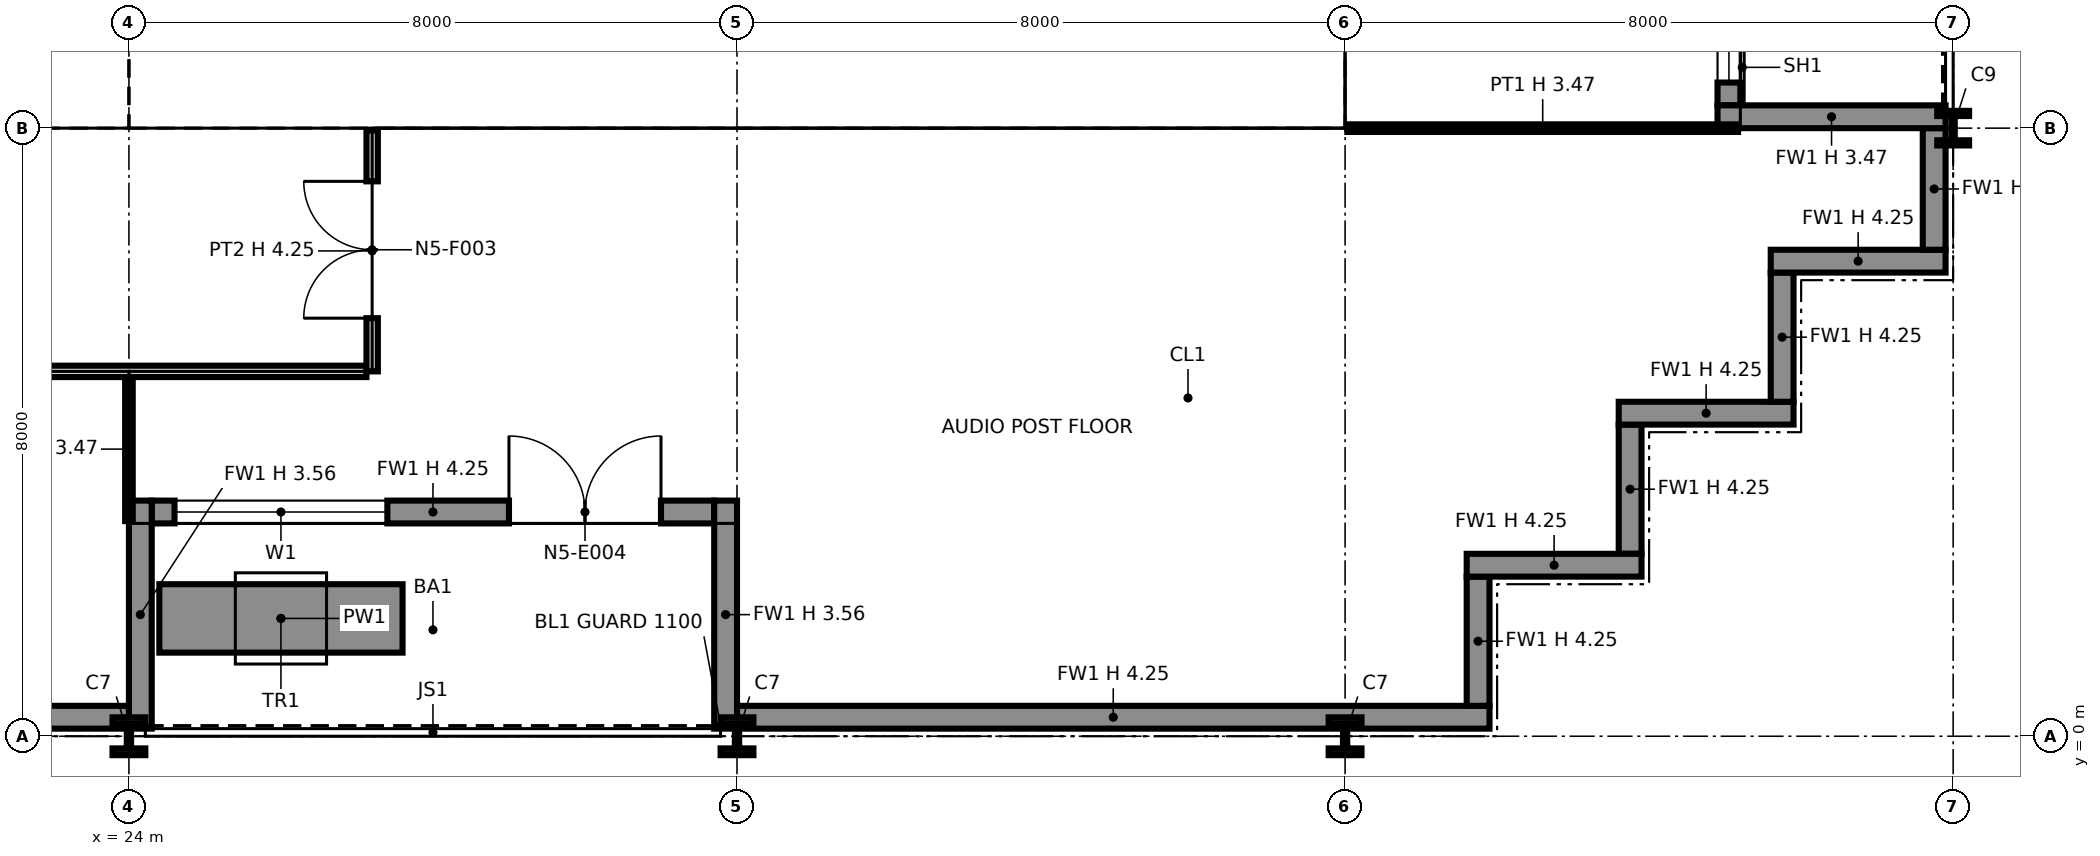
"""IFC4 building model, lengths in metres.
Left out: names, types, materials, properties, quantities, classifications, styles, units other than length and angle.
Written with IfcOpenShell. Run it as: python <this file> out.ifc"""

import sys

from ifc_helpers import new_model, si_unit, direction, frame, frame_2d, origin, origin_2d, place, context, subcontext, project, spatial, polyline, rectangle, i_section, outline, extrude, element, fill, save


model = new_model("IFC4")
c1 = context("Model", 3, precision=1e-05, world=origin(), true_north=direction((0.0, 1.0)))
c2 = subcontext(c1, "Body", "Model", "MODEL_VIEW")
j1 = project(units=[si_unit("LENGTHUNIT", "METRE"), si_unit("PLANEANGLEUNIT", "RADIAN")], contexts=[c1])
p1 = place(None, origin())
s1 = spatial("IfcSite", under=j1, at=p1, CompositionType="ELEMENT")
p2 = place(p1, origin())
s2 = spatial("IfcBuilding", under=s1, at=p2, CompositionType="ELEMENT")
p3 = place(p2, frame((0.0, 0.0, 92.0)))
s3 = spatial("IfcBuildingStorey", under=s2, at=p3, CompositionType="ELEMENT", Elevation=92.0)
p4 = place(p3, frame((24.0, 0.0, 0.0), z_axis=(0.0, 0.0, 1.0), x_axis=(1.0, 0.0, 0.0)))
e1 = element("IfcColumn", 1, at=p4, inside=s3, PredefinedType="COLUMN", context=c2, shape_type="SweptSolid", body=[
    extrude(i_section(OverallWidth=0.432, OverallDepth=0.498, WebThickness=0.056, FlangeThickness=0.089, at=origin_2d()), origin(), (0.0, 0.0, 1.0), 4.25),
])
p5 = place(p3, frame((24.0, 8.0, 0.0), z_axis=(0.0, 0.0, 1.0), x_axis=(1.0, 0.0, 0.0)))
e2 = element("IfcColumn", 2, at=p5, inside=s3, PredefinedType="COLUMN", context=c2, shape_type="SweptSolid", body=[
    extrude(i_section(OverallWidth=0.411, OverallDepth=0.434, WebThickness=0.036, FlangeThickness=0.057, at=origin_2d()), origin(), (0.0, 0.0, 1.0), 4.25),
])
p6 = place(p3, frame((32.0, 0.0, 0.0), z_axis=(0.0, 0.0, 1.0), x_axis=(1.0, 0.0, 0.0)))
e3 = element("IfcColumn", 3, at=p6, inside=s3, PredefinedType="COLUMN", context=c2, shape_type="SweptSolid", body=[
    extrude(i_section(OverallWidth=0.432, OverallDepth=0.498, WebThickness=0.056, FlangeThickness=0.089, at=origin_2d()), origin(), (0.0, 0.0, 1.0), 4.25),
])
p7 = place(p3, frame((32.0, 8.0, 0.0), z_axis=(0.0, 0.0, 1.0), x_axis=(1.0, 0.0, 0.0)))
e4 = element("IfcColumn", 4, at=p7, inside=s3, PredefinedType="COLUMN", context=c2, shape_type="SweptSolid", body=[
    extrude(i_section(OverallWidth=0.406, OverallDepth=0.417, WebThickness=0.03, FlangeThickness=0.048, at=origin_2d()), origin(), (0.0, 0.0, 1.0), 4.25),
])
p8 = place(p3, frame((40.0, 0.0, 0.0), z_axis=(0.0, 0.0, 1.0), x_axis=(1.0, 0.0, 0.0)))
e5 = element("IfcColumn", 5, at=p8, inside=s3, PredefinedType="COLUMN", context=c2, shape_type="SweptSolid", body=[
    extrude(i_section(OverallWidth=0.432, OverallDepth=0.498, WebThickness=0.056, FlangeThickness=0.089, at=origin_2d()), origin(), (0.0, 0.0, 1.0), 4.25),
])
p9 = place(p3, frame((40.0, 8.0, 0.0), z_axis=(0.0, 0.0, 1.0), x_axis=(1.0, 0.0, 0.0)))
e6 = element("IfcColumn", 6, at=p9, inside=s3, PredefinedType="COLUMN", context=c2, shape_type="SweptSolid", body=[
    extrude(i_section(OverallWidth=0.406, OverallDepth=0.417, WebThickness=0.03, FlangeThickness=0.048, at=origin_2d()), origin(), (0.0, 0.0, 1.0), 4.25),
])
p10 = place(p3, frame((48.0, 8.0, 0.0), z_axis=(0.0, 0.0, 1.0), x_axis=(1.0, 0.0, 0.0)))
e7 = element("IfcColumn", 7, at=p10, inside=s3, PredefinedType="COLUMN", context=c2, shape_type="SweptSolid", body=[
    extrude(i_section(OverallWidth=0.419, OverallDepth=0.455, WebThickness=0.042, FlangeThickness=0.068, at=origin_2d()), origin(), (0.0, 0.0, 1.0), 4.25),
])
p11 = place(p3, frame((16.0, 0.25, 0.0), z_axis=(0.0, 0.0, 1.0), x_axis=(1.0, 0.0, 0.0)))
e8 = element("IfcWall", 8, at=p11, inside=s3, PredefinedType="SOLIDWALL", context=c2, shape_type="SweptSolid", body=[
    extrude(rectangle(XDim=8.0, YDim=0.3, at=frame_2d((4.0, 0.0))), origin(), (0.0, 0.0, 1.0), 4.25),
])
p12 = place(p3, frame((24.3, 2.95, 0.0), z_axis=(0.0, 0.0, 1.0), x_axis=(1.0, 0.0, 0.0)))
e9 = element("IfcWall", 9, at=p12, inside=s3, PredefinedType="SOLIDWALL", context=c2, shape_type="SweptSolid", body=[
    extrude(rectangle(XDim=7.4, YDim=0.3, at=frame_2d((3.7, 0.0))), origin(), (0.0, 0.0, 1.0), 4.25),
])
p13 = place(p12, frame((0.3, 0.0, 0.9)))
e10 = element("IfcOpeningElement", 10, at=p13, cuts=e9, PredefinedType="OPENING", context=c2, shape_type="SweptSolid", body=[
    extrude(rectangle(XDim=2.8, YDim=2.2, at=frame_2d((1.4, 1.1))), frame((0.0, 0.16, 0.0), z_axis=(0.0, -1.0, 0.0), x_axis=(1.0, 0.0, 0.0)), (0.0, 0.0, 1.0), 0.32),
])
p14 = place(p12, frame((4.7, 0.0, 0.0)))
e11 = element("IfcOpeningElement", 11, at=p14, cuts=e9, PredefinedType="OPENING", context=c2, shape_type="SweptSolid", body=[
    extrude(rectangle(XDim=2.0, YDim=2.4, at=frame_2d((1.0, 1.2))), frame((0.0, 0.16, 0.0), z_axis=(0.0, -1.0, 0.0), x_axis=(1.0, 0.0, 0.0)), (0.0, 0.0, 1.0), 0.32),
])
for number, where, z_axis, x_axis in (
    (12, (24.15, 0.1, 0.0), (0.0, 0.0, 1.0), (0.0, 1.0, 0.0)),
    (13, (31.85, 0.1, 0.0), (0.0, 0.0, 1.0), (0.0, 1.0, 0.0)),
):
    element("IfcWall", number, at=place(p3, frame(where, z_axis=z_axis, x_axis=x_axis)), inside=s3, PredefinedType="SOLIDWALL", context=c2, shape_type="SweptSolid", body=[
        extrude(rectangle(XDim=3.0, YDim=0.3, at=frame_2d((1.5, 0.0))), origin(), (0.0, 0.0, 1.0), 3.556),
    ])
p15 = place(p3, frame((32.0, 0.25, 0.0), z_axis=(0.0, 0.0, 1.0), x_axis=(1.0, 0.0, 0.0)))
e14 = element("IfcWall", 14, at=p15, inside=s3, PredefinedType="SOLIDWALL", context=c2, shape_type="SweptSolid", body=[
    extrude(rectangle(XDim=9.9, YDim=0.3, at=frame_2d((4.95, 0.0))), origin(), (0.0, 0.0, 1.0), 4.25),
])
p16 = place(p3, frame((24.4, 1.55, 0.0), z_axis=(0.0, 0.0, 1.0), x_axis=(1.0, 0.0, 0.0)))
e15 = element("IfcWall", 15, at=p16, inside=s3, PredefinedType="SOLIDWALL", context=c2, shape_type="SweptSolid", body=[
    extrude(rectangle(XDim=3.2, YDim=0.9, at=frame_2d((1.6, 0.0))), origin(), (0.0, 0.0, 1.0), 0.6),
])
p17 = place(p3, frame((41.75, 0.4, 0.0), z_axis=(0.0, 0.0, 1.0), x_axis=(0.0, 1.0, 0.0)))
e16 = element("IfcWall", 16, at=p17, inside=s3, PredefinedType="SOLIDWALL", context=c2, shape_type="SweptSolid", body=[
    extrude(rectangle(XDim=1.7, YDim=0.3, at=frame_2d((0.85, 0.0))), origin(), (0.0, 0.0, 1.0), 4.25),
])
p18 = place(p3, frame((41.6, 2.25, 0.0), z_axis=(0.0, 0.0, 1.0), x_axis=(1.0, 0.0, 0.0)))
e17 = element("IfcWall", 17, at=p18, inside=s3, PredefinedType="SOLIDWALL", context=c2, shape_type="SweptSolid", body=[
    extrude(rectangle(XDim=2.3, YDim=0.3, at=frame_2d((1.15, 0.0))), origin(), (0.0, 0.0, 1.0), 4.25),
])
p19 = place(p3, frame((43.75, 2.4, 0.0), z_axis=(0.0, 0.0, 1.0), x_axis=(0.0, 1.0, 0.0)))
e18 = element("IfcWall", 18, at=p19, inside=s3, PredefinedType="SOLIDWALL", context=c2, shape_type="SweptSolid", body=[
    extrude(rectangle(XDim=1.7, YDim=0.3, at=frame_2d((0.85, 0.0))), origin(), (0.0, 0.0, 1.0), 4.25),
])
p20 = place(p3, frame((43.6, 4.25, 0.0), z_axis=(0.0, 0.0, 1.0), x_axis=(1.0, 0.0, 0.0)))
e19 = element("IfcWall", 19, at=p20, inside=s3, PredefinedType="SOLIDWALL", context=c2, shape_type="SweptSolid", body=[
    extrude(rectangle(XDim=2.3, YDim=0.3, at=frame_2d((1.15, 0.0))), origin(), (0.0, 0.0, 1.0), 4.25),
])
p21 = place(p3, frame((45.75, 4.4, 0.0), z_axis=(0.0, 0.0, 1.0), x_axis=(0.0, 1.0, 0.0)))
e20 = element("IfcWall", 20, at=p21, inside=s3, PredefinedType="SOLIDWALL", context=c2, shape_type="SweptSolid", body=[
    extrude(rectangle(XDim=1.7, YDim=0.3, at=frame_2d((0.85, 0.0))), origin(), (0.0, 0.0, 1.0), 4.25),
])
p22 = place(p3, frame((45.6, 6.25, 0.0), z_axis=(0.0, 0.0, 1.0), x_axis=(1.0, 0.0, 0.0)))
e21 = element("IfcWall", 21, at=p22, inside=s3, PredefinedType="SOLIDWALL", context=c2, shape_type="SweptSolid", body=[
    extrude(rectangle(XDim=2.3, YDim=0.3, at=frame_2d((1.15, 0.0))), origin(), (0.0, 0.0, 1.0), 4.25),
])
p23 = place(p3, frame((47.75, 6.4, 0.0), z_axis=(0.0, 0.0, 1.0), x_axis=(0.0, 1.0, 0.0)))
e22 = element("IfcWall", 22, at=p23, inside=s3, PredefinedType="SOLIDWALL", context=c2, shape_type="SweptSolid", body=[
    extrude(rectangle(XDim=1.6, YDim=0.3, at=frame_2d((0.8, 0.0))), origin(), (0.0, 0.0, 1.0), 4.25),
])
p24 = place(p3, frame((45.05, 8.3, 0.0), z_axis=(0.0, 0.0, 1.0), x_axis=(0.0, 1.0, 0.0)))
e23 = element("IfcWall", 23, at=p24, inside=s3, PredefinedType="SOLIDWALL", context=c2, shape_type="SweptSolid", body=[
    extrude(rectangle(XDim=7.4, YDim=0.3, at=frame_2d((3.7, 0.0))), origin(), (0.0, 0.0, 1.0), 4.25),
])
p25 = place(p24, frame((0.3, 0.0, 0.9)))
e24 = element("IfcOpeningElement", 24, at=p25, cuts=e23, PredefinedType="OPENING", context=c2, shape_type="SweptSolid", body=[
    extrude(rectangle(XDim=2.8, YDim=2.2, at=frame_2d((1.4, 1.1))), frame((0.0, 0.16, 0.0), z_axis=(0.0, -1.0, 0.0), x_axis=(1.0, 0.0, 0.0)), (0.0, 0.0, 1.0), 0.32),
])
p26 = place(p24, frame((4.7, 0.0, 0.0)))
e25 = element("IfcOpeningElement", 25, at=p26, cuts=e23, PredefinedType="OPENING", context=c2, shape_type="SweptSolid", body=[
    extrude(rectangle(XDim=2.0, YDim=2.4, at=frame_2d((1.0, 1.2))), frame((0.0, 0.16, 0.0), z_axis=(0.0, -1.0, 0.0), x_axis=(1.0, 0.0, 0.0)), (0.0, 0.0, 1.0), 0.32),
])
p27 = place(p3, frame((47.9, 8.15, 0.0), z_axis=(0.0, 0.0, 1.0), x_axis=(-1.0, 0.0, 0.0)))
e26 = element("IfcWall", 26, at=p27, inside=s3, PredefinedType="SOLIDWALL", context=c2, shape_type="SweptSolid", body=[
    extrude(rectangle(XDim=3.0, YDim=0.3, at=frame_2d((1.5, 0.0))), origin(), (0.0, 0.0, 1.0), 3.469),
])
p28 = place(p3, frame((8.65, 8.75, 0.0), z_axis=(0.0, 0.0, 1.0), x_axis=(1.0, 0.0, 0.0)))
e27 = element("IfcWall", 27, at=p28, inside=s3, PredefinedType="PARTITIONING", context=c2, shape_type="SweptSolid", body=[
    extrude(outline(polyline([(0.0, 0.0), (14.7, 0.0), (14.7, 4.25), (7.469, 4.25), (7.469, 3.632), (7.231, 3.632), (7.23, 4.25), (0.0, 4.25), (0.0, 0.0)])), frame((0.0, 0.1, 0.0), z_axis=(0.0, -1.0, 0.0), x_axis=(1.0, 0.0, 0.0)), (0.0, 0.0, 1.0), 0.2),
])
p29 = place(p28, frame((1.3, 0.0, 0.0)))
e28 = element("IfcOpeningElement", 28, at=p29, cuts=e27, PredefinedType="OPENING", context=c2, shape_type="SweptSolid", body=[
    extrude(rectangle(XDim=1.4, YDim=2.1, at=frame_2d((0.7, 1.05))), frame((0.0, 0.11, 0.0), z_axis=(0.0, -1.0, 0.0), x_axis=(1.0, 0.0, 0.0)), (0.0, 0.0, 1.0), 0.22),
])
p30 = place(p28, frame((4.6, 0.0, 0.0)))
e29 = element("IfcOpeningElement", 29, at=p30, cuts=e27, PredefinedType="OPENING", context=c2, shape_type="SweptSolid", body=[
    extrude(rectangle(XDim=1.4, YDim=2.1, at=frame_2d((0.7, 1.05))), frame((0.0, 0.11, 0.0), z_axis=(0.0, -1.0, 0.0), x_axis=(1.0, 0.0, 0.0)), (0.0, 0.0, 1.0), 0.22),
])
p31 = place(p28, frame((10.4, 0.0, 0.0)))
e30 = element("IfcOpeningElement", 30, at=p31, cuts=e27, PredefinedType="OPENING", context=c2, shape_type="SweptSolid", body=[
    extrude(rectangle(XDim=1.2, YDim=2.1, at=frame_2d((0.6, 1.05))), frame((0.0, 0.11, 0.0), z_axis=(0.0, -1.0, 0.0), x_axis=(1.0, 0.0, 0.0)), (0.0, 0.0, 1.0), 0.22),
])
p32 = place(p3, frame((23.25, 8.85, 0.0), z_axis=(0.0, 0.0, 1.0), x_axis=(0.0, 1.0, 0.0)))
e31 = element("IfcWall", 31, at=p32, inside=s3, PredefinedType="PARTITIONING", context=c2, shape_type="SweptSolid", body=[
    extrude(outline(polyline([(0.0, 0.0), (14.3, 0.0), (14.3, 4.25), (11.231, 4.25), (11.23, 3.789), (11.07, 3.789), (11.069, 4.25), (7.27, 4.25), (7.269, 3.632), (7.031, 3.632), (7.031, 4.25), (1.231, 4.25), (1.23, 3.789), (1.07, 3.789), (1.069, 4.25), (0.0, 4.25), (0.0, 0.0)])), frame((0.0, 0.1, 0.0), z_axis=(0.0, -1.0, 0.0), x_axis=(1.0, 0.0, 0.0)), (0.0, 0.0, 1.0), 0.2),
])
p33 = place(p32, frame((8.3, 0.0, 0.0)))
e32 = element("IfcOpeningElement", 32, at=p33, cuts=e31, PredefinedType="OPENING", context=c2, shape_type="SweptSolid", body=[
    extrude(rectangle(XDim=1.8, YDim=2.1, at=frame_2d((0.9, 1.05))), frame((0.0, 0.11, 0.0), z_axis=(0.0, -1.0, 0.0), x_axis=(1.0, 0.0, 0.0)), (0.0, 0.0, 1.0), 0.22),
])
p34 = place(p3, frame((24.65, 8.75, 0.0), z_axis=(0.0, 0.0, 1.0), x_axis=(1.0, 0.0, 0.0)))
e33 = element("IfcWall", 33, at=p34, inside=s3, PredefinedType="PARTITIONING", context=c2, shape_type="SweptSolid", body=[
    extrude(outline(polyline([(0.0, 0.0), (14.7, 0.0), (14.7, 4.25), (7.469, 4.25), (7.469, 3.632), (7.231, 3.632), (7.23, 4.25), (0.0, 4.25), (0.0, 0.0)])), frame((0.0, 0.1, 0.0), z_axis=(0.0, -1.0, 0.0), x_axis=(1.0, 0.0, 0.0)), (0.0, 0.0, 1.0), 0.2),
])
p35 = place(p3, frame((24.75, 8.85, 0.0), z_axis=(0.0, 0.0, 1.0), x_axis=(0.0, 1.0, 0.0)))
e34 = element("IfcWall", 34, at=p35, inside=s3, PredefinedType="PARTITIONING", context=c2, shape_type="SweptSolid", body=[
    extrude(outline(polyline([(0.0, 0.0), (6.3, 0.0), (6.3, 4.25), (3.231, 4.25), (3.23, 3.789), (3.07, 3.789), (3.069, 4.25), (0.0, 4.25), (0.0, 0.0)])), frame((0.0, 0.1, 0.0), z_axis=(0.0, -1.0, 0.0), x_axis=(1.0, 0.0, 0.0)), (0.0, 0.0, 1.0), 0.2),
])
for number, where, z_axis, x_axis in (
    (35, (27.875, 8.85, 0.0), (0.0, 0.0, 1.0), (0.0, 1.0, 0.0)),
    (36, (29.925, 8.85, 0.0), (0.0, 0.0, 1.0), (0.0, 1.0, 0.0)),
):
    element("IfcWall", number, at=place(p3, frame(where, z_axis=z_axis, x_axis=x_axis)), inside=s3, PredefinedType="PARTITIONING", context=c2, shape_type="SweptSolid", body=[
        extrude(outline(polyline([(0.0, 0.0), (4.2, 0.0), (4.2, 4.25), (3.231, 4.25), (3.23, 3.789), (3.07, 3.789), (3.069, 4.25), (0.0, 4.25), (0.0, 0.0)])), frame((0.0, 0.075, 0.0), z_axis=(0.0, -1.0, 0.0), x_axis=(1.0, 0.0, 0.0)), (0.0, 0.0, 1.0), 0.15),
    ])
p36 = place(p3, frame((32.0, 8.85, 0.0), z_axis=(0.0, 0.0, 1.0), x_axis=(0.0, 1.0, 0.0)))
e37 = element("IfcWall", 37, at=p36, inside=s3, PredefinedType="PARTITIONING", context=c2, shape_type="SweptSolid", body=[
    extrude(rectangle(XDim=4.2, YDim=0.6, at=frame_2d((2.1, 0.0))), origin(), (0.0, 0.0, 1.0), 3.632),
])
for number, where, z_axis, x_axis in (
    (38, (35.6, 8.85, 0.0), (0.0, 0.0, 1.0), (0.0, 1.0, 0.0)),
    (39, (39.25, 8.85, 0.0), (0.0, 0.0, 1.0), (0.0, 1.0, 0.0)),
):
    element("IfcWall", number, at=place(p3, frame(where, z_axis=z_axis, x_axis=x_axis)), inside=s3, PredefinedType="PARTITIONING", context=c2, shape_type="SweptSolid", body=[
        extrude(rectangle(XDim=6.3, YDim=0.2, at=frame_2d((3.15, 0.0))), origin(), (0.0, 0.0, 1.0), 4.25),
    ])
p37 = place(p3, frame((24.0, 2.83, 0.0), z_axis=(0.0, 0.0, 1.0), x_axis=(0.0, 1.0, 0.0)))
e40 = element("IfcWall", 40, at=p37, inside=s3, PredefinedType="PARTITIONING", context=c2, shape_type="SweptSolid", body=[
    extrude(rectangle(XDim=1.895, YDim=0.1, at=frame_2d((0.948, 0.0))), origin(), (0.0, 0.0, 1.0), 3.47),
])
p38 = place(p3, frame((4.875, 4.8, 0.0), z_axis=(0.0, 0.0, 1.0), x_axis=(1.0, 0.0, 0.0)))
e41 = element("IfcWall", 41, at=p38, inside=s3, PredefinedType="PARTITIONING", context=c2, shape_type="SweptSolid", body=[
    extrude(rectangle(XDim=22.25, YDim=0.15, at=frame_2d((11.125, 0.0))), origin(), (0.0, 0.0, 1.0), 4.25),
])
p39 = place(p38, frame((13.625, 0.0, 0.0), z_axis=(0.0, 0.0, 1.0), x_axis=(-1.0, 0.0, 0.0)))
e42 = element("IfcOpeningElement", 42, at=p39, cuts=e41, PredefinedType="OPENING", context=c2, shape_type="SweptSolid", body=[
    extrude(rectangle(XDim=1.0, YDim=2.1, at=frame_2d((0.5, 1.05))), frame((0.0, 0.085, 0.0), z_axis=(0.0, -1.0, 0.0), x_axis=(1.0, 0.0, 0.0)), (0.0, 0.0, 1.0), 0.17),
])
p40 = place(p38, frame((17.625, 0.0, 0.0), z_axis=(0.0, 0.0, 1.0), x_axis=(-1.0, 0.0, 0.0)))
e43 = element("IfcOpeningElement", 43, at=p40, cuts=e41, PredefinedType="OPENING", context=c2, shape_type="SweptSolid", body=[
    extrude(rectangle(XDim=1.0, YDim=2.1, at=frame_2d((0.5, 1.05))), frame((0.0, 0.085, 0.0), z_axis=(0.0, -1.0, 0.0), x_axis=(1.0, 0.0, 0.0)), (0.0, 0.0, 1.0), 0.17),
])
p41 = place(p38, frame((7.625, 0.0, 0.0), z_axis=(0.0, 0.0, 1.0), x_axis=(-1.0, 0.0, 0.0)))
e44 = element("IfcOpeningElement", 44, at=p41, cuts=e41, PredefinedType="OPENING", context=c2, shape_type="SweptSolid", body=[
    extrude(rectangle(XDim=1.0, YDim=2.1, at=frame_2d((0.5, 1.05))), frame((0.0, 0.085, 0.0), z_axis=(0.0, -1.0, 0.0), x_axis=(1.0, 0.0, 0.0)), (0.0, 0.0, 1.0), 0.17),
])
p42 = place(p3, frame((27.2, 4.8, 0.0), z_axis=(0.0, 0.0, 1.0), x_axis=(0.0, 1.0, 0.0)))
e45 = element("IfcWall", 45, at=p42, inside=s3, PredefinedType="PARTITIONING", context=c2, shape_type="SweptSolid", body=[
    extrude(rectangle(XDim=3.17, YDim=0.15, at=frame_2d((1.585, 0.0))), origin(), (0.0, 0.0, 1.0), 4.25),
])
p43 = place(p42, frame((0.7, 0.0, 0.0)))
e46 = element("IfcOpeningElement", 46, at=p43, cuts=e45, PredefinedType="OPENING", context=c2, shape_type="SweptSolid", body=[
    extrude(rectangle(XDim=1.8, YDim=2.1, at=frame_2d((0.9, 1.05))), frame((0.0, 0.085, 0.0), z_axis=(0.0, -1.0, 0.0), x_axis=(1.0, 0.0, 0.0)), (0.0, 0.0, 1.0), 0.17),
])
p44 = place(p3, frame((40.03, 8.0, 0.0), z_axis=(0.0, 0.0, 1.0), x_axis=(1.0, 0.0, 0.0)))
e47 = element("IfcWall", 47, at=p44, inside=s3, PredefinedType="PARTITIONING", context=c2, shape_type="SweptSolid", body=[
    extrude(rectangle(XDim=5.14, YDim=0.1, at=frame_2d((2.57, 0.0))), origin(), (0.0, 0.0, 1.0), 3.47),
])
p45 = place(p13, origin())
e48 = element("IfcWindow", 48, at=p45, inside=s3, PartitioningType="SINGLE_PANEL", PredefinedType="WINDOW", context=c2, shape_type="SweptSolid", body=[
    extrude(rectangle(XDim=2.8, YDim=2.2, at=frame_2d((1.4, 1.1))), frame((0.0, 0.03, 0.0), z_axis=(0.0, -1.0, 0.0), x_axis=(1.0, 0.0, 0.0)), (0.0, 0.0, 1.0), 0.06),
])
fill(e10, e48)
p46 = place(p14, origin())
e49 = element("IfcDoor", 49, at=p46, inside=s3, OperationType="DOUBLE_DOOR_SINGLE_SWING", PredefinedType="DOOR", context=c2, shape_type="SweptSolid", body=[
    extrude(rectangle(XDim=2.0, YDim=2.4, at=frame_2d((1.0, 1.2))), frame((0.0, 0.025, 0.0), z_axis=(0.0, -1.0, 0.0), x_axis=(1.0, 0.0, 0.0)), (0.0, 0.0, 1.0), 0.05),
])
fill(e11, e49)
p47 = place(p25, origin())
e50 = element("IfcWindow", 50, at=p47, inside=s3, PartitioningType="SINGLE_PANEL", PredefinedType="WINDOW", context=c2, shape_type="SweptSolid", body=[
    extrude(rectangle(XDim=2.8, YDim=2.2, at=frame_2d((1.4, 1.1))), frame((0.0, 0.03, 0.0), z_axis=(0.0, -1.0, 0.0), x_axis=(1.0, 0.0, 0.0)), (0.0, 0.0, 1.0), 0.06),
])
fill(e24, e50)
p48 = place(p43, origin())
e51 = element("IfcDoor", 51, at=p48, inside=s3, OperationType="DOUBLE_DOOR_SINGLE_SWING", PredefinedType="DOOR", context=c2, shape_type="SweptSolid", body=[
    extrude(rectangle(XDim=1.8, YDim=2.1, at=frame_2d((0.9, 1.05))), frame((0.0, 0.025, 0.0), z_axis=(0.0, -1.0, 0.0), x_axis=(1.0, 0.0, 0.0)), (0.0, 0.0, 1.0), 0.05),
])
fill(e46, e51)
save(model, sys.argv[1])
